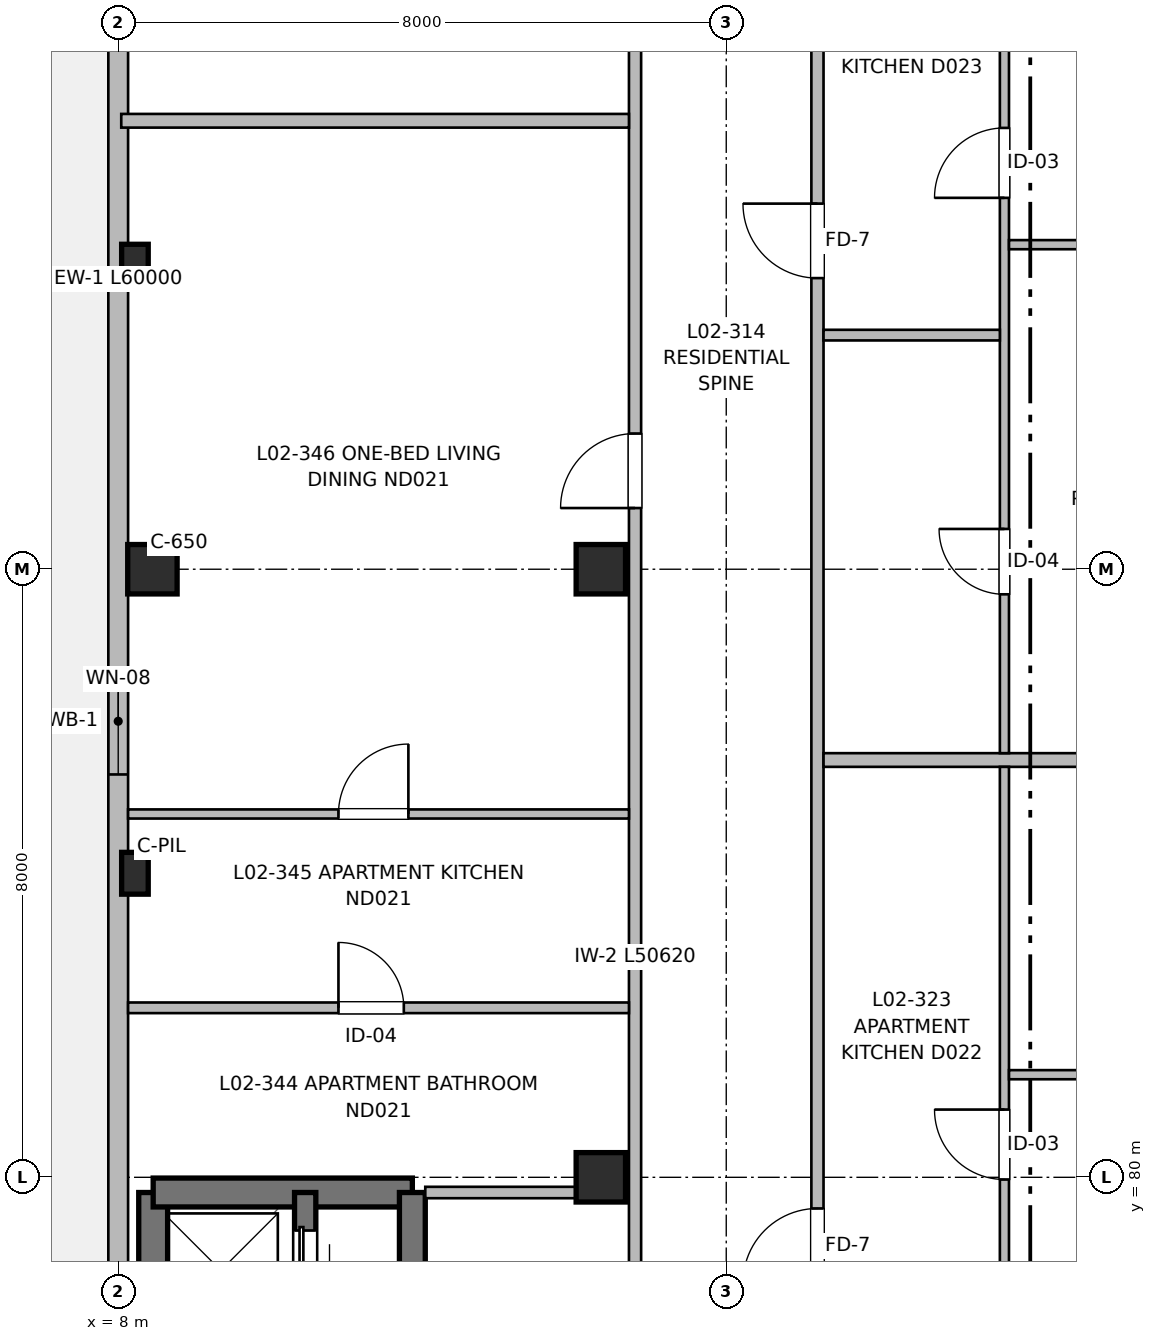
"""IFC4 building model, lengths in metres.
Left out: names, types, materials, properties, quantities, classifications, styles, units other than length and angle.
Written with IfcOpenShell. Run it as: python <this file> out.ifc"""

import sys

from ifc_helpers import new_model, si_unit, direction, frame, frame_2d, origin, origin_2d, place, context, subcontext, project, spatial, rectangle, extrude, element, fill, save


model = new_model("IFC4")
c1 = context("Model", 3, precision=1e-05, world=origin(), true_north=direction((0.0, 1.0)))
c2 = subcontext(c1, "Body", "Model", "MODEL_VIEW")
j1 = project(units=[si_unit("LENGTHUNIT", "METRE"), si_unit("PLANEANGLEUNIT", "RADIAN")], contexts=[c1])
p1 = place(None, origin())
s1 = spatial("IfcSite", under=j1, at=p1, CompositionType="ELEMENT")
p2 = place(p1, origin())
s2 = spatial("IfcBuilding", under=s1, at=p2, CompositionType="ELEMENT")
p3 = place(p2, frame((0.0, 0.0, 7.36)))
s3 = spatial("IfcBuildingStorey", under=s2, at=p3, CompositionType="ELEMENT", Elevation=7.36)
for number, where, z_axis, x_axis in (
    (1, (8.22, 84.0, 0.0), (0.0, 0.0, 1.0), (1.0, 0.0, 0.0)),
    (2, (8.22, 92.0, 0.0), (0.0, 0.0, 1.0), (1.0, 0.0, 0.0)),
):
    element("IfcColumn", number, at=place(p3, frame(where, z_axis=z_axis, x_axis=x_axis)), inside=s3, PredefinedType="PILASTER", context=c2, shape_type="SweptSolid", body=[
        extrude(rectangle(XDim=0.35, YDim=0.55, at=origin_2d()), origin(), (0.0, 0.0, 1.0), 3.2),
    ])
for number, where, z_axis, x_axis in (
    (3, (8.45, 88.0, 0.0), (0.0, 0.0, 1.0), (1.0, 0.0, 0.0)),
    (4, (14.35, 80.0, 0.0), (0.0, 0.0, 1.0), (1.0, 0.0, 0.0)),
    (5, (14.35, 88.0, 0.0), (0.0, 0.0, 1.0), (1.0, 0.0, 0.0)),
):
    element("IfcColumn", number, at=place(p3, frame(where, z_axis=z_axis, x_axis=x_axis)), inside=s3, PredefinedType="COLUMN", context=c2, shape_type="SweptSolid", body=[
        extrude(rectangle(XDim=0.65, YDim=0.65, at=origin_2d()), origin(), (0.0, 0.0, 1.0), 3.2),
    ])
p4 = place(p3, frame((8.46, 67.35, 0.0), z_axis=(0.0, 0.0, 1.0), x_axis=(0.0, 1.0, 0.0)))
e6 = element("IfcWall", 6, at=p4, inside=s3, PredefinedType="SHEAR", context=c2, shape_type="SweptSolid", body=[
    extrude(rectangle(XDim=12.45, YDim=0.38, at=frame_2d((6.225, 0.0))), origin(), (0.0, 0.0, 1.0), 3.2),
])
p5 = place(p4, frame((2.2, 0.0, 0.97)))
e7 = element("IfcOpeningElement", 7, at=p5, cuts=e6, PredefinedType="OPENING", context=c2, shape_type="SweptSolid", body=[
    extrude(rectangle(XDim=0.95, YDim=1.25, at=frame_2d((0.475, 0.625))), frame((0.0, 0.2, 0.0), z_axis=(0.0, -1.0, 0.0), x_axis=(1.0, 0.0, 0.0)), (0.0, 0.0, 1.0), 0.4),
])
p6 = place(p3, frame((8.46, 79.8, 0.0), z_axis=(0.0, 0.0, 1.0), x_axis=(1.0, 0.0, 0.0)))
e8 = element("IfcWall", 8, at=p6, inside=s3, PredefinedType="SHEAR", context=c2, shape_type="SweptSolid", body=[
    extrude(rectangle(XDim=3.41, YDim=0.38, at=frame_2d((1.705, 0.0))), origin(), (0.0, 0.0, 1.0), 3.2),
])
p7 = place(p3, frame((11.87, 79.8, 0.0), z_axis=(0.0, 0.0, 1.0), x_axis=(0.0, -1.0, 0.0)))
e9 = element("IfcWall", 9, at=p7, inside=s3, PredefinedType="SHEAR", context=c2, shape_type="SweptSolid", body=[
    extrude(rectangle(XDim=12.45, YDim=0.34, at=frame_2d((6.225, 0.0))), origin(), (0.0, 0.0, 1.0), 3.2),
])
p8 = place(p7, frame((10.85, 0.0, 0.0)))
e10 = element("IfcOpeningElement", 10, at=p8, cuts=e9, PredefinedType="OPENING", context=c2, shape_type="SweptSolid", body=[
    extrude(rectangle(XDim=1.05, YDim=2.15, at=frame_2d((0.525, 1.075))), frame((0.0, 0.18, 0.0), z_axis=(0.0, -1.0, 0.0), x_axis=(1.0, 0.0, 0.0)), (0.0, 0.0, 1.0), 0.36),
])
p9 = place(p3, frame((10.46, 74.55, 0.0), z_axis=(0.0, 0.0, 1.0), x_axis=(0.0, 1.0, 0.0)))
e11 = element("IfcWall", 11, at=p9, inside=s3, PredefinedType="SHEAR", context=c2, shape_type="SweptSolid", body=[
    extrude(rectangle(XDim=5.25, YDim=0.28, at=frame_2d((2.625, 0.0))), origin(), (0.0, 0.0, 1.0), 3.2),
])
p10 = place(p9, frame((1.15, 0.0, 0.0)))
e12 = element("IfcOpeningElement", 12, at=p10, cuts=e11, PredefinedType="OPENING", context=c2, shape_type="SweptSolid", body=[
    extrude(rectangle(XDim=1.0, YDim=2.15, at=frame_2d((0.5, 1.075))), frame((0.0, 0.15, 0.0), z_axis=(0.0, -1.0, 0.0), x_axis=(1.0, 0.0, 0.0)), (0.0, 0.0, 1.0), 0.3),
])
p11 = place(p9, frame((3.85, 0.0, 0.0)))
e13 = element("IfcOpeningElement", 13, at=p11, cuts=e11, PredefinedType="OPENING", context=c2, shape_type="SweptSolid", body=[
    extrude(rectangle(XDim=0.9, YDim=2.15, at=frame_2d((0.45, 1.075))), frame((0.0, 0.15, 0.0), z_axis=(0.0, -1.0, 0.0), x_axis=(1.0, 0.0, 0.0)), (0.0, 0.0, 1.0), 0.3),
])
p12 = place(p3, frame((8.0, 56.0, 0.0), z_axis=(0.0, 0.0, 1.0), x_axis=(0.0, 1.0, 0.0)))
e14 = element("IfcWall", 14, at=p12, inside=s3, PredefinedType="SOLIDWALL", context=c2, shape_type="SweptSolid", body=[
    extrude(rectangle(XDim=60.0, YDim=0.26, at=frame_2d((30.0, 0.0))), origin(), (0.0, 0.0, 1.0), 2.98),
])
p13 = place(p12, frame((4.886, 0.0, 0.0)))
e15 = element("IfcOpeningElement", 15, at=p13, cuts=e14, PredefinedType="OPENING", context=c2, shape_type="SweptSolid", body=[
    extrude(rectangle(XDim=1.2, YDim=2.2, at=frame_2d((0.6, 1.1))), frame((0.0, 0.14, 0.0), z_axis=(0.0, -1.0, 0.0), x_axis=(1.0, 0.0, 0.0)), (0.0, 0.0, 1.0), 0.28),
])
p14 = place(p12, frame((12.107, 0.0, 0.82)))
e16 = element("IfcOpeningElement", 16, at=p14, cuts=e14, PredefinedType="OPENING", context=c2, shape_type="SweptSolid", body=[
    extrude(rectangle(XDim=1.5, YDim=1.4, at=frame_2d((0.75, 0.7))), frame((0.0, 0.14, 0.0), z_axis=(0.0, -1.0, 0.0), x_axis=(1.0, 0.0, 0.0)), (0.0, 0.0, 1.0), 0.28),
])
p15 = place(p12, frame((19.804, 0.0, 0.82)))
e17 = element("IfcOpeningElement", 17, at=p15, cuts=e14, PredefinedType="OPENING", context=c2, shape_type="SweptSolid", body=[
    extrude(rectangle(XDim=1.55, YDim=1.4, at=frame_2d((0.775, 0.7))), frame((0.0, 0.14, 0.0), z_axis=(0.0, -1.0, 0.0), x_axis=(1.0, 0.0, 0.0)), (0.0, 0.0, 1.0), 0.28),
])
p16 = place(p12, frame((29.3, 0.0, 0.87)))
e18 = element("IfcOpeningElement", 18, at=p16, cuts=e14, PredefinedType="OPENING", context=c2, shape_type="SweptSolid", body=[
    extrude(rectangle(XDim=1.4, YDim=1.35, at=frame_2d((0.7, 0.675))), frame((0.0, 0.14, 0.0), z_axis=(0.0, -1.0, 0.0), x_axis=(1.0, 0.0, 0.0)), (0.0, 0.0, 1.0), 0.28),
])
p17 = place(p12, frame((40.946, 0.0, 0.87)))
e19 = element("IfcOpeningElement", 19, at=p17, cuts=e14, PredefinedType="OPENING", context=c2, shape_type="SweptSolid", body=[
    extrude(rectangle(XDim=1.25, YDim=1.35, at=frame_2d((0.625, 0.675))), frame((0.0, 0.14, 0.0), z_axis=(0.0, -1.0, 0.0), x_axis=(1.0, 0.0, 0.0)), (0.0, 0.0, 1.0), 0.28),
])
p18 = place(p12, frame((46.493, 0.0, 0.82)))
e20 = element("IfcOpeningElement", 20, at=p18, cuts=e14, PredefinedType="OPENING", context=c2, shape_type="SweptSolid", body=[
    extrude(rectangle(XDim=1.3, YDim=1.4, at=frame_2d((0.65, 0.7))), frame((0.0, 0.14, 0.0), z_axis=(0.0, -1.0, 0.0), x_axis=(1.0, 0.0, 0.0)), (0.0, 0.0, 1.0), 0.28),
])
p19 = place(p12, frame((55.514, 0.0, 0.67)))
e21 = element("IfcOpeningElement", 21, at=p19, cuts=e14, PredefinedType="OPENING", context=c2, shape_type="SweptSolid", body=[
    extrude(rectangle(XDim=2.1, YDim=1.55, at=frame_2d((1.05, 0.775))), frame((0.0, 0.14, 0.0), z_axis=(0.0, -1.0, 0.0), x_axis=(1.0, 0.0, 0.0)), (0.0, 0.0, 1.0), 0.28),
])
p20 = place(p3, frame((12.04, 79.8, 0.0), z_axis=(0.0, 0.0, 1.0), x_axis=(1.0, 0.0, 0.0)))
e22 = element("IfcWall", 22, at=p20, inside=s3, PredefinedType="PARTITIONING", context=c2, shape_type="SweptSolid", body=[
    extrude(rectangle(XDim=2.68, YDim=0.15, at=frame_2d((1.34, 0.0))), origin(), (0.0, 0.0, 1.0), 2.935),
])
p21 = place(p3, frame((14.8, 56.18, 0.0), z_axis=(0.0, 0.0, 1.0), x_axis=(0.0, 1.0, 0.0)))
e23 = element("IfcWall", 23, at=p21, inside=s3, PredefinedType="PARTITIONING", context=c2, shape_type="SweptSolid", body=[
    extrude(rectangle(XDim=50.62, YDim=0.16, at=frame_2d((25.31, 0.0))), origin(), (0.0, 0.0, 1.0), 2.935),
])
p22 = place(p21, frame((12.82, 0.0, 0.0)))
e24 = element("IfcOpeningElement", 24, at=p22, cuts=e23, PredefinedType="OPENING", context=c2, shape_type="SweptSolid", body=[
    extrude(rectangle(XDim=1.1, YDim=2.15, at=frame_2d((0.55, 1.075))), frame((0.0, 0.09, 0.0), z_axis=(0.0, -1.0, 0.0), x_axis=(1.0, 0.0, 0.0)), (0.0, 0.0, 1.0), 0.18),
])
p23 = place(p21, frame((19.22, 0.0, 0.0)))
e25 = element("IfcOpeningElement", 25, at=p23, cuts=e23, PredefinedType="OPENING", context=c2, shape_type="SweptSolid", body=[
    extrude(rectangle(XDim=1.6, YDim=2.15, at=frame_2d((0.8, 1.075))), frame((0.0, 0.09, 0.0), z_axis=(0.0, -1.0, 0.0), x_axis=(1.0, 0.0, 0.0)), (0.0, 0.0, 1.0), 0.18),
])
p24 = place(p21, frame((1.8, 0.0, 0.0)))
e26 = element("IfcOpeningElement", 26, at=p24, cuts=e23, PredefinedType="OPENING", context=c2, shape_type="SweptSolid", body=[
    extrude(rectangle(XDim=0.96, YDim=2.15, at=frame_2d((0.48, 1.075))), frame((0.0, 0.09, 0.0), z_axis=(0.0, -1.0, 0.0), x_axis=(1.0, 0.0, 0.0)), (0.0, 0.0, 1.0), 0.18),
])
p25 = place(p21, frame((32.625, 0.0, 0.0)))
e27 = element("IfcOpeningElement", 27, at=p25, cuts=e23, PredefinedType="OPENING", context=c2, shape_type="SweptSolid", body=[
    extrude(rectangle(XDim=0.98, YDim=2.15, at=frame_2d((0.49, 1.075))), frame((0.0, 0.09, 0.0), z_axis=(0.0, -1.0, 0.0), x_axis=(1.0, 0.0, 0.0)), (0.0, 0.0, 1.0), 0.18),
])
p26 = place(p21, frame((41.235, 0.0, 0.0)))
e28 = element("IfcOpeningElement", 28, at=p26, cuts=e23, PredefinedType="OPENING", context=c2, shape_type="SweptSolid", body=[
    extrude(rectangle(XDim=0.98, YDim=2.15, at=frame_2d((0.49, 1.075))), frame((0.0, 0.09, 0.0), z_axis=(0.0, -1.0, 0.0), x_axis=(1.0, 0.0, 0.0)), (0.0, 0.0, 1.0), 0.18),
])
p27 = place(p3, frame((17.2, 56.18, 0.0), z_axis=(0.0, 0.0, 1.0), x_axis=(0.0, 1.0, 0.0)))
e29 = element("IfcWall", 29, at=p27, inside=s3, PredefinedType="PARTITIONING", context=c2, shape_type="SweptSolid", body=[
    extrude(rectangle(XDim=50.62, YDim=0.16, at=frame_2d((25.31, 0.0))), origin(), (0.0, 0.0, 1.0), 2.935),
])
p28 = place(p27, frame((7.68, 0.0, 0.0)))
e30 = element("IfcOpeningElement", 30, at=p28, cuts=e29, PredefinedType="OPENING", context=c2, shape_type="SweptSolid", body=[
    extrude(rectangle(XDim=0.98, YDim=2.15, at=frame_2d((0.49, 1.075))), frame((0.0, 0.09, 0.0), z_axis=(0.0, -1.0, 0.0), x_axis=(1.0, 0.0, 0.0)), (0.0, 0.0, 1.0), 0.18),
])
p29 = place(p27, frame((22.43, 0.0, 0.0)))
e31 = element("IfcOpeningElement", 31, at=p29, cuts=e29, PredefinedType="OPENING", context=c2, shape_type="SweptSolid", body=[
    extrude(rectangle(XDim=0.98, YDim=2.15, at=frame_2d((0.49, 1.075))), frame((0.0, 0.09, 0.0), z_axis=(0.0, -1.0, 0.0), x_axis=(1.0, 0.0, 0.0)), (0.0, 0.0, 1.0), 0.18),
])
p30 = place(p27, frame((35.65, 0.0, 0.0)))
e32 = element("IfcOpeningElement", 32, at=p30, cuts=e29, PredefinedType="OPENING", context=c2, shape_type="SweptSolid", body=[
    extrude(rectangle(XDim=0.98, YDim=2.15, at=frame_2d((0.49, 1.075))), frame((0.0, 0.09, 0.0), z_axis=(0.0, -1.0, 0.0), x_axis=(1.0, 0.0, 0.0)), (0.0, 0.0, 1.0), 0.18),
])
p31 = place(p27, frame((46.42, 0.0, 0.0)))
e33 = element("IfcOpeningElement", 33, at=p31, cuts=e29, PredefinedType="OPENING", context=c2, shape_type="SweptSolid", body=[
    extrude(rectangle(XDim=0.98, YDim=2.15, at=frame_2d((0.49, 1.075))), frame((0.0, 0.09, 0.0), z_axis=(0.0, -1.0, 0.0), x_axis=(1.0, 0.0, 0.0)), (0.0, 0.0, 1.0), 0.18),
])
p32 = place(p3, frame((17.28, 85.49, 0.0), z_axis=(0.0, 0.0, 1.0), x_axis=(1.0, 0.0, 0.0)))
e34 = element("IfcWall", 34, at=p32, inside=s3, PredefinedType="PARTITIONING", context=c2, shape_type="SweptSolid", body=[
    extrude(rectangle(XDim=6.59, YDim=0.18, at=frame_2d((3.295, 0.0))), origin(), (0.0, 0.0, 1.0), 2.935),
])
p33 = place(p3, frame((19.66, 71.43, 0.0), z_axis=(0.0, 0.0, 1.0), x_axis=(0.0, 1.0, 0.0)))
e35 = element("IfcWall", 35, at=p33, inside=s3, PredefinedType="PARTITIONING", context=c2, shape_type="SweptSolid", body=[
    extrude(rectangle(XDim=13.97, YDim=0.12, at=frame_2d((6.985, 0.0))), origin(), (0.0, 0.0, 1.0), 2.935),
])
p34 = place(p33, frame((2.443, 0.0, 0.0)))
e36 = element("IfcOpeningElement", 36, at=p34, cuts=e35, PredefinedType="OPENING", context=c2, shape_type="SweptSolid", body=[
    extrude(rectangle(XDim=0.86, YDim=2.1, at=frame_2d((0.43, 1.05))), frame((0.0, 0.07, 0.0), z_axis=(0.0, -1.0, 0.0), x_axis=(1.0, 0.0, 0.0)), (0.0, 0.0, 1.0), 0.14),
])
p35 = place(p33, frame((8.541, 0.0, 0.0)))
e37 = element("IfcOpeningElement", 37, at=p35, cuts=e35, PredefinedType="OPENING", context=c2, shape_type="SweptSolid", body=[
    extrude(rectangle(XDim=0.92, YDim=2.1, at=frame_2d((0.46, 1.05))), frame((0.0, 0.07, 0.0), z_axis=(0.0, -1.0, 0.0), x_axis=(1.0, 0.0, 0.0)), (0.0, 0.0, 1.0), 0.14),
])
p36 = place(p3, frame((19.72, 81.35, 0.0), z_axis=(0.0, 0.0, 1.0), x_axis=(1.0, 0.0, 0.0)))
e38 = element("IfcWall", 38, at=p36, inside=s3, PredefinedType="PARTITIONING", context=c2, shape_type="SweptSolid", body=[
    extrude(rectangle(XDim=4.15, YDim=0.12, at=frame_2d((2.075, 0.0))), origin(), (0.0, 0.0, 1.0), 2.935),
])
p37 = place(p36, frame((1.635, 0.0, 0.0)))
e39 = element("IfcOpeningElement", 39, at=p37, cuts=e38, PredefinedType="OPENING", context=c2, shape_type="SweptSolid", body=[
    extrude(rectangle(XDim=0.88, YDim=2.1, at=frame_2d((0.44, 1.05))), frame((0.0, 0.07, 0.0), z_axis=(0.0, -1.0, 0.0), x_axis=(1.0, 0.0, 0.0)), (0.0, 0.0, 1.0), 0.14),
])
p38 = place(p3, frame((19.66, 85.58, 0.0), z_axis=(0.0, 0.0, 1.0), x_axis=(0.0, 1.0, 0.0)))
e40 = element("IfcWall", 40, at=p38, inside=s3, PredefinedType="PARTITIONING", context=c2, shape_type="SweptSolid", body=[
    extrude(rectangle(XDim=11.95, YDim=0.12, at=frame_2d((5.975, 0.0))), origin(), (0.0, 0.0, 1.0), 2.935),
])
p39 = place(p38, frame((2.09, 0.0, 0.0)))
e41 = element("IfcOpeningElement", 41, at=p39, cuts=e40, PredefinedType="OPENING", context=c2, shape_type="SweptSolid", body=[
    extrude(rectangle(XDim=0.86, YDim=2.1, at=frame_2d((0.43, 1.05))), frame((0.0, 0.07, 0.0), z_axis=(0.0, -1.0, 0.0), x_axis=(1.0, 0.0, 0.0)), (0.0, 0.0, 1.0), 0.14),
])
p40 = place(p38, frame((7.306, 0.0, 0.0)))
e42 = element("IfcOpeningElement", 42, at=p40, cuts=e40, PredefinedType="OPENING", context=c2, shape_type="SweptSolid", body=[
    extrude(rectangle(XDim=0.92, YDim=2.1, at=frame_2d((0.46, 1.05))), frame((0.0, 0.07, 0.0), z_axis=(0.0, -1.0, 0.0), x_axis=(1.0, 0.0, 0.0)), (0.0, 0.0, 1.0), 0.14),
])
p41 = place(p3, frame((17.28, 91.08, 0.0), z_axis=(0.0, 0.0, 1.0), x_axis=(1.0, 0.0, 0.0)))
e43 = element("IfcWall", 43, at=p41, inside=s3, PredefinedType="PARTITIONING", context=c2, shape_type="SweptSolid", body=[
    extrude(rectangle(XDim=2.32, YDim=0.14, at=frame_2d((1.16, 0.0))), origin(), (0.0, 0.0, 1.0), 2.935),
])
p42 = place(p3, frame((19.72, 92.27, 0.0), z_axis=(0.0, 0.0, 1.0), x_axis=(1.0, 0.0, 0.0)))
e44 = element("IfcWall", 44, at=p42, inside=s3, PredefinedType="PARTITIONING", context=c2, shape_type="SweptSolid", body=[
    extrude(rectangle(XDim=6.245, YDim=0.12, at=frame_2d((3.123, 0.0))), origin(), (0.0, 0.0, 1.0), 2.935),
])
p43 = place(p42, frame((1.625, 0.0, 0.0)))
e45 = element("IfcOpeningElement", 45, at=p43, cuts=e44, PredefinedType="OPENING", context=c2, shape_type="SweptSolid", body=[
    extrude(rectangle(XDim=0.9, YDim=2.1, at=frame_2d((0.45, 1.05))), frame((0.0, 0.07, 0.0), z_axis=(0.0, -1.0, 0.0), x_axis=(1.0, 0.0, 0.0)), (0.0, 0.0, 1.0), 0.14),
])
p44 = place(p3, frame((8.04, 93.9, 0.0), z_axis=(0.0, 0.0, 1.0), x_axis=(1.0, 0.0, 0.0)))
e46 = element("IfcWall", 46, at=p44, inside=s3, PredefinedType="PARTITIONING", context=c2, shape_type="SweptSolid", body=[
    extrude(rectangle(XDim=6.68, YDim=0.18, at=frame_2d((3.34, 0.0))), origin(), (0.0, 0.0, 1.0), 2.935),
])
p45 = place(p3, frame((8.13, 82.23, 0.0), z_axis=(0.0, 0.0, 1.0), x_axis=(1.0, 0.0, 0.0)))
e47 = element("IfcWall", 47, at=p45, inside=s3, PredefinedType="PARTITIONING", context=c2, shape_type="SweptSolid", body=[
    extrude(rectangle(XDim=6.59, YDim=0.14, at=frame_2d((3.295, 0.0))), origin(), (0.0, 0.0, 1.0), 2.935),
])
p46 = place(p45, frame((2.768, 0.0, 0.0)))
e48 = element("IfcOpeningElement", 48, at=p46, cuts=e47, PredefinedType="OPENING", context=c2, shape_type="SweptSolid", body=[
    extrude(rectangle(XDim=0.86, YDim=2.1, at=frame_2d((0.43, 1.05))), frame((0.0, 0.08, 0.0), z_axis=(0.0, -1.0, 0.0), x_axis=(1.0, 0.0, 0.0)), (0.0, 0.0, 1.0), 0.16),
])
p47 = place(p3, frame((8.13, 84.78, 0.0), z_axis=(0.0, 0.0, 1.0), x_axis=(1.0, 0.0, 0.0)))
e49 = element("IfcWall", 49, at=p47, inside=s3, PredefinedType="PARTITIONING", context=c2, shape_type="SweptSolid", body=[
    extrude(rectangle(XDim=6.59, YDim=0.12, at=frame_2d((3.295, 0.0))), origin(), (0.0, 0.0, 1.0), 2.935),
])
p48 = place(p47, frame((2.768, 0.0, 0.0)))
e50 = element("IfcOpeningElement", 50, at=p48, cuts=e49, PredefinedType="OPENING", context=c2, shape_type="SweptSolid", body=[
    extrude(rectangle(XDim=0.92, YDim=2.1, at=frame_2d((0.46, 1.05))), frame((0.0, 0.07, 0.0), z_axis=(0.0, -1.0, 0.0), x_axis=(1.0, 0.0, 0.0)), (0.0, 0.0, 1.0), 0.14),
])
p49 = place(p11, origin())
e51 = element("IfcDoor", 51, at=p49, inside=s3, OperationType="SLIDING_TO_RIGHT", PredefinedType="DOOR", context=c2, shape_type="SweptSolid", body=[
    extrude(rectangle(XDim=0.9, YDim=2.15, at=frame_2d((0.45, 1.075))), frame((0.0, 0.025, 0.0), z_axis=(0.0, -1.0, 0.0), x_axis=(1.0, 0.0, 0.0)), (0.0, 0.0, 1.0), 0.05),
])
fill(e13, e51)
p50 = place(p16, origin())
e52 = element("IfcWindow", 52, at=p50, inside=s3, PartitioningType="SINGLE_PANEL", PredefinedType="WINDOW", context=c2, shape_type="SweptSolid", body=[
    extrude(rectangle(XDim=1.4, YDim=1.35, at=frame_2d((0.7, 0.675))), frame((0.0, 0.03, 0.0), z_axis=(0.0, -1.0, 0.0), x_axis=(1.0, 0.0, 0.0)), (0.0, 0.0, 1.0), 0.06),
])
fill(e18, e52)
p51 = place(p35, origin())
e53 = element("IfcDoor", 53, at=p51, inside=s3, OperationType="SINGLE_SWING_RIGHT", PredefinedType="DOOR", context=c2, shape_type="SweptSolid", body=[
    extrude(rectangle(XDim=0.92, YDim=2.1, at=frame_2d((0.46, 1.05))), frame((0.0, 0.025, 0.0), z_axis=(0.0, -1.0, 0.0), x_axis=(1.0, 0.0, 0.0)), (0.0, 0.0, 1.0), 0.05),
])
fill(e37, e53)
p52 = place(p29, origin())
e54 = element("IfcDoor", 54, at=p52, inside=s3, OperationType="SINGLE_SWING_LEFT", PredefinedType="DOOR", context=c2, shape_type="SweptSolid", body=[
    extrude(rectangle(XDim=0.98, YDim=2.15, at=frame_2d((0.49, 1.075))), frame((0.0, 0.025, 0.0), z_axis=(0.0, -1.0, 0.0), x_axis=(1.0, 0.0, 0.0)), (0.0, 0.0, 1.0), 0.05),
])
fill(e31, e54)
p53 = place(p39, origin())
e55 = element("IfcDoor", 55, at=p53, inside=s3, OperationType="SINGLE_SWING_RIGHT", PredefinedType="DOOR", context=c2, shape_type="SweptSolid", body=[
    extrude(rectangle(XDim=0.86, YDim=2.1, at=frame_2d((0.43, 1.05))), frame((0.0, 0.025, 0.0), z_axis=(0.0, -1.0, 0.0), x_axis=(1.0, 0.0, 0.0)), (0.0, 0.0, 1.0), 0.05),
])
fill(e41, e55)
p54 = place(p40, origin())
e56 = element("IfcDoor", 56, at=p54, inside=s3, OperationType="SINGLE_SWING_LEFT", PredefinedType="DOOR", context=c2, shape_type="SweptSolid", body=[
    extrude(rectangle(XDim=0.92, YDim=2.1, at=frame_2d((0.46, 1.05))), frame((0.0, 0.025, 0.0), z_axis=(0.0, -1.0, 0.0), x_axis=(1.0, 0.0, 0.0)), (0.0, 0.0, 1.0), 0.05),
])
fill(e42, e56)
p55 = place(p30, origin())
e57 = element("IfcDoor", 57, at=p55, inside=s3, OperationType="SINGLE_SWING_RIGHT", PredefinedType="DOOR", context=c2, shape_type="SweptSolid", body=[
    extrude(rectangle(XDim=0.98, YDim=2.15, at=frame_2d((0.49, 1.075))), frame((0.0, 0.025, 0.0), z_axis=(0.0, -1.0, 0.0), x_axis=(1.0, 0.0, 0.0)), (0.0, 0.0, 1.0), 0.05),
])
fill(e32, e57)
p56 = place(p46, origin())
e58 = element("IfcDoor", 58, at=p56, inside=s3, OperationType="SINGLE_SWING_LEFT", PredefinedType="DOOR", context=c2, shape_type="SweptSolid", body=[
    extrude(rectangle(XDim=0.86, YDim=2.1, at=frame_2d((0.43, 1.05))), frame((0.0, 0.025, 0.0), z_axis=(0.0, -1.0, 0.0), x_axis=(1.0, 0.0, 0.0)), (0.0, 0.0, 1.0), 0.05),
])
fill(e48, e58)
p57 = place(p48, origin())
e59 = element("IfcDoor", 59, at=p57, inside=s3, OperationType="SINGLE_SWING_RIGHT", PredefinedType="DOOR", context=c2, shape_type="SweptSolid", body=[
    extrude(rectangle(XDim=0.92, YDim=2.1, at=frame_2d((0.46, 1.05))), frame((0.0, 0.025, 0.0), z_axis=(0.0, -1.0, 0.0), x_axis=(1.0, 0.0, 0.0)), (0.0, 0.0, 1.0), 0.05),
])
fill(e50, e59)
p58 = place(p25, origin())
e60 = element("IfcDoor", 60, at=p58, inside=s3, OperationType="SINGLE_SWING_LEFT", PredefinedType="DOOR", context=c2, shape_type="SweptSolid", body=[
    extrude(rectangle(XDim=0.98, YDim=2.15, at=frame_2d((0.49, 1.075))), frame((0.0, 0.025, 0.0), z_axis=(0.0, -1.0, 0.0), x_axis=(1.0, 0.0, 0.0)), (0.0, 0.0, 1.0), 0.05),
])
fill(e27, e60)
save(model, sys.argv[1])
